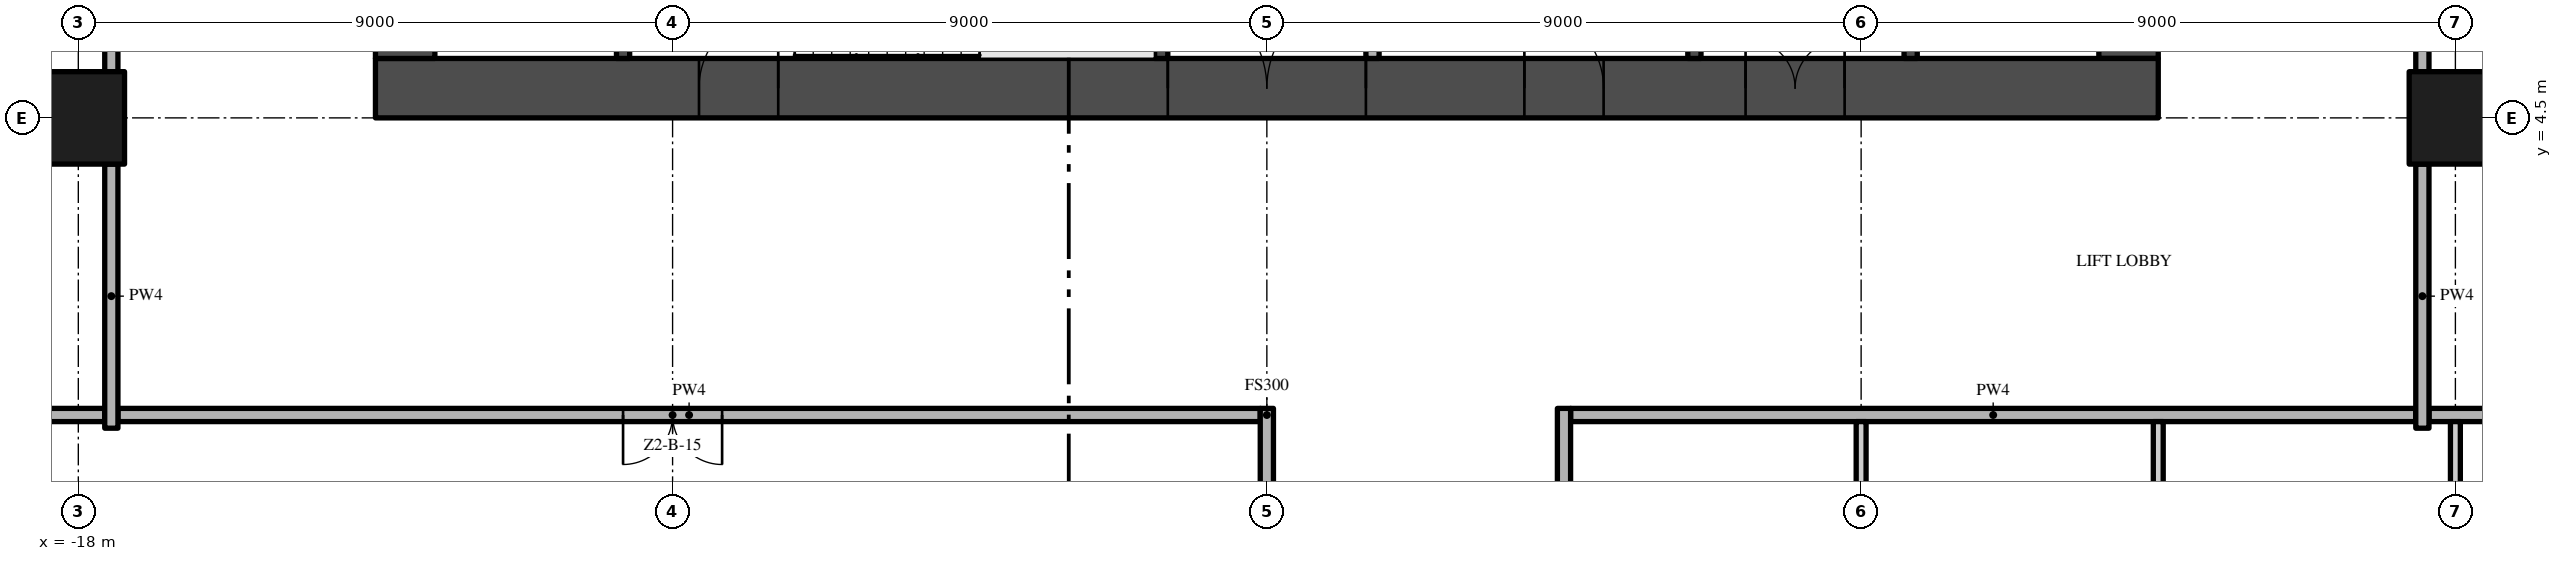
"""IFC4 building model, lengths in metres.
Left out: names, types, materials, properties, quantities, classifications, styles, units other than length and angle.
Written with IfcOpenShell. Run it as: python <this file> out.ifc"""

import sys

from ifc_helpers import new_model, si_unit, direction, frame, frame_2d, origin, origin_2d, place, context, subcontext, project, spatial, rectangle, extrude, element, fill, save


model = new_model("IFC4")
c1 = context("Model", 3, precision=1e-05, world=origin(), true_north=direction((0.0, 1.0)))
c2 = subcontext(c1, "Body", "Model", "MODEL_VIEW")
j1 = project(units=[si_unit("LENGTHUNIT", "METRE"), si_unit("PLANEANGLEUNIT", "RADIAN")], contexts=[c1])
p1 = place(None, origin())
s1 = spatial("IfcSite", under=j1, at=p1, CompositionType="ELEMENT")
p2 = place(p1, origin())
s2 = spatial("IfcBuilding", under=s1, at=p2, CompositionType="ELEMENT")
p3 = place(p2, frame((0.0, 0.0, 84.6)))
s3 = spatial("IfcBuildingStorey", under=s2, at=p3, CompositionType="ELEMENT", Elevation=84.6)
p4 = place(p3, frame((-13.5, 4.95, -0.3), z_axis=(0.0, 0.0, 1.0), x_axis=(1.0, 0.0, 0.0)))
e1 = element("IfcWall", 1, at=p4, inside=s3, PredefinedType="SHEAR", context=c2, shape_type="SweptSolid", body=[
    extrude(rectangle(XDim=27.0, YDim=0.9, at=frame_2d((13.5, 0.0))), origin(), (0.0, 0.0, 1.0), 3.8),
])
p5 = place(p4, frame((12.0, 0.0, 0.3)))
e2 = element("IfcOpeningElement", 2, at=p5, cuts=e1, PredefinedType="OPENING", context=c2, shape_type="SweptSolid", body=[
    extrude(rectangle(XDim=3.0, YDim=2.4, at=frame_2d((1.5, 1.2))), frame((0.0, 0.46, 0.0), z_axis=(0.0, -1.0, 0.0), x_axis=(1.0, 0.0, 0.0)), (0.0, 0.0, 1.0), 0.92),
])
p6 = place(p4, frame((4.9, 0.0, 0.3)))
e3 = element("IfcOpeningElement", 3, at=p6, cuts=e1, PredefinedType="OPENING", context=c2, shape_type="SweptSolid", body=[
    extrude(rectangle(XDim=1.2, YDim=2.2, at=frame_2d((0.6, 1.1))), frame((0.0, 0.46, 0.0), z_axis=(0.0, -1.0, 0.0), x_axis=(1.0, 0.0, 0.0)), (0.0, 0.0, 1.0), 0.92),
])
p7 = place(p4, frame((20.75, 0.0, 0.3)))
e4 = element("IfcOpeningElement", 4, at=p7, cuts=e1, PredefinedType="OPENING", context=c2, shape_type="SweptSolid", body=[
    extrude(rectangle(XDim=1.5, YDim=2.2, at=frame_2d((0.75, 1.1))), frame((0.0, 0.46, 0.0), z_axis=(0.0, -1.0, 0.0), x_axis=(1.0, 0.0, 0.0)), (0.0, 0.0, 1.0), 0.92),
])
p8 = place(p4, frame((17.4, 0.0, 0.3)))
e5 = element("IfcOpeningElement", 5, at=p8, cuts=e1, PredefinedType="OPENING", context=c2, shape_type="SweptSolid", body=[
    extrude(rectangle(XDim=1.2, YDim=2.2, at=frame_2d((0.6, 1.1))), frame((0.0, 0.46, 0.0), z_axis=(0.0, -1.0, 0.0), x_axis=(1.0, 0.0, 0.0)), (0.0, 0.0, 1.0), 0.92),
])
p9 = place(p3, frame((13.05, 5.4, -0.3), z_axis=(0.0, 0.0, 1.0), x_axis=(0.0, 1.0, 0.0)))
e6 = element("IfcWall", 6, at=p9, inside=s3, PredefinedType="SHEAR", context=c2, shape_type="SweptSolid", body=[
    extrude(rectangle(XDim=16.2, YDim=0.9, at=frame_2d((8.1, 0.0))), origin(), (0.0, 0.0, 1.0), 3.8),
])
p10 = place(p9, frame((6.0, 0.0, 0.3)))
e7 = element("IfcOpeningElement", 7, at=p10, cuts=e6, PredefinedType="OPENING", context=c2, shape_type="SweptSolid", body=[
    extrude(rectangle(XDim=1.2, YDim=2.2, at=frame_2d((0.6, 1.1))), frame((0.0, 0.46, 0.0), z_axis=(0.0, -1.0, 0.0), x_axis=(1.0, 0.0, 0.0)), (0.0, 0.0, 1.0), 0.92),
])
p11 = place(p3, frame((-13.05, 21.6, -0.3), z_axis=(0.0, 0.0, 1.0), x_axis=(0.0, -1.0, 0.0)))
e8 = element("IfcWall", 8, at=p11, inside=s3, PredefinedType="SHEAR", context=c2, shape_type="SweptSolid", body=[
    extrude(rectangle(XDim=16.2, YDim=0.9, at=frame_2d((8.1, 0.0))), origin(), (0.0, 0.0, 1.0), 3.8),
])
p12 = place(p11, frame((9.0, 0.0, 0.3)))
e9 = element("IfcOpeningElement", 9, at=p12, cuts=e8, PredefinedType="OPENING", context=c2, shape_type="SweptSolid", body=[
    extrude(rectangle(XDim=1.2, YDim=2.2, at=frame_2d((0.6, 1.1))), frame((0.0, 0.46, 0.0), z_axis=(0.0, -1.0, 0.0), x_axis=(1.0, 0.0, 0.0)), (0.0, 0.0, 1.0), 0.92),
])
for number, where, z_axis, x_axis in (
    (10, (-18.0, 4.5, 0.0), (0.0, 0.0, 1.0), (1.0, 0.0, 0.0)),
    (11, (18.0, 4.5, 0.0), (0.0, 0.0, 1.0), (1.0, 0.0, 0.0)),
):
    element("IfcColumn", number, at=place(p3, frame(where, z_axis=z_axis, x_axis=x_axis)), inside=s3, PredefinedType="COLUMN", context=c2, shape_type="SweptSolid", body=[
        extrude(rectangle(XDim=1.4, YDim=1.4, at=origin_2d()), origin(), (0.0, 0.0, 1.0), 3.5),
    ])
for number, where, z_axis, x_axis in (
    (12, (-9.75, 5.4, 0.0), (0.0, 0.0, 1.0), (0.0, 1.0, 0.0)),
    (13, (-1.6, 5.4, 0.0), (0.0, 0.0, 1.0), (0.0, 1.0, 0.0)),
):
    element("IfcWall", number, at=place(p3, frame(where, z_axis=z_axis, x_axis=x_axis)), inside=s3, PredefinedType="SHEAR", context=c2, shape_type="SweptSolid", body=[
        extrude(rectangle(XDim=2.55, YDim=0.2, at=frame_2d((1.275, 0.0))), origin(), (0.0, 0.0, 1.0), 3.5),
    ])
p13 = place(p3, frame((1.6, 7.5, 0.0), z_axis=(0.0, 0.0, 1.0), x_axis=(0.0, -1.0, 0.0)))
e14 = element("IfcWall", 14, at=p13, inside=s3, PredefinedType="PARTITIONING", context=c2, shape_type="SweptSolid", body=[
    extrude(rectangle(XDim=2.1, YDim=0.2, at=frame_2d((1.05, 0.0))), origin(), (0.0, 0.0, 1.0), 3.5),
])
p14 = place(p13, frame((0.25, 0.0, 0.0)))
e15 = element("IfcOpeningElement", 15, at=p14, cuts=e14, PredefinedType="OPENING", context=c2, shape_type="SweptSolid", body=[
    extrude(rectangle(XDim=0.9, YDim=2.1, at=frame_2d((0.45, 1.05))), frame((0.0, 0.11, 0.0), z_axis=(0.0, -1.0, 0.0), x_axis=(1.0, 0.0, 0.0)), (0.0, 0.0, 1.0), 0.22),
])
p15 = place(p3, frame((6.475, 5.4, 0.0), z_axis=(0.0, 0.0, 1.0), x_axis=(0.0, 1.0, 0.0)))
e16 = element("IfcWall", 16, at=p15, inside=s3, PredefinedType="SHEAR", context=c2, shape_type="SweptSolid", body=[
    extrude(rectangle(XDim=2.1, YDim=0.2, at=frame_2d((1.05, 0.0))), origin(), (0.0, 0.0, 1.0), 3.5),
])
p16 = place(p3, frame((9.75, 5.4, 0.0), z_axis=(0.0, 0.0, 1.0), x_axis=(0.0, 1.0, 0.0)))
e17 = element("IfcWall", 17, at=p16, inside=s3, PredefinedType="SHEAR", context=c2, shape_type="SweptSolid", body=[
    extrude(rectangle(XDim=2.2, YDim=0.2, at=frame_2d((1.1, 0.0))), origin(), (0.0, 0.0, 1.0), 3.5),
])
p17 = place(p16, frame((0.55, 0.0, 0.0)))
e18 = element("IfcOpeningElement", 18, at=p17, cuts=e17, PredefinedType="OPENING", context=c2, shape_type="SweptSolid", body=[
    extrude(rectangle(XDim=1.1, YDim=2.1, at=frame_2d((0.55, 1.05))), frame((0.0, 0.11, 0.0), z_axis=(0.0, -1.0, 0.0), x_axis=(1.0, 0.0, 0.0)), (0.0, 0.0, 1.0), 0.22),
])
p18 = place(p3, frame((-0.1, 0.0, 0.0), z_axis=(0.0, 0.0, 1.0), x_axis=(-1.0, 0.0, 0.0)))
e19 = element("IfcWall", 19, at=p18, inside=s3, PredefinedType="PARTITIONING", context=c2, shape_type="SweptSolid", body=[
    extrude(rectangle(XDim=17.3, YDim=0.2, at=frame_2d((8.65, 0.0))), origin(), (0.0, 0.0, 1.0), 3.5),
])
p19 = place(p18, frame((8.15, 0.0, 0.0)))
e20 = element("IfcOpeningElement", 20, at=p19, cuts=e19, PredefinedType="OPENING", context=c2, shape_type="SweptSolid", body=[
    extrude(rectangle(XDim=1.5, YDim=2.4, at=frame_2d((0.75, 1.2))), frame((0.0, 0.11, 0.0), z_axis=(0.0, -1.0, 0.0), x_axis=(1.0, 0.0, 0.0)), (0.0, 0.0, 1.0), 0.22),
])
p20 = place(p3, frame((4.6, 0.0, 0.0), z_axis=(0.0, 0.0, 1.0), x_axis=(1.0, 0.0, 0.0)))
e21 = element("IfcWall", 21, at=p20, inside=s3, PredefinedType="PARTITIONING", context=c2, shape_type="SweptSolid", body=[
    extrude(rectangle(XDim=12.8, YDim=0.2, at=frame_2d((6.4, 0.0))), origin(), (0.0, 0.0, 1.0), 3.5),
])
for number, where, z_axis, x_axis in (
    (22, (-26.7, 0.0, 0.0), (0.0, 0.0, 1.0), (1.0, 0.0, 0.0)),
    (23, (17.6, 0.0, 0.0), (0.0, 0.0, 1.0), (1.0, 0.0, 0.0)),
):
    element("IfcWall", number, at=place(p3, frame(where, z_axis=z_axis, x_axis=x_axis)), inside=s3, PredefinedType="PARTITIONING", context=c2, shape_type="SweptSolid", body=[
        extrude(rectangle(XDim=9.1, YDim=0.2, at=frame_2d((4.55, 0.0))), origin(), (0.0, 0.0, 1.0), 3.5),
    ])
p21 = place(p3, frame((-17.5, -0.2, 0.0), z_axis=(0.0, 0.0, 1.0), x_axis=(0.0, 1.0, 0.0)))
e24 = element("IfcWall", 24, at=p21, inside=s3, PredefinedType="PARTITIONING", context=c2, shape_type="SweptSolid", body=[
    extrude(rectangle(XDim=4.0, YDim=0.2, at=frame_2d((2.0, 0.0))), origin(), (0.0, 0.0, 1.0), 3.5),
])
p22 = place(p3, frame((-17.5, 5.2, 0.0), z_axis=(0.0, 0.0, 1.0), x_axis=(0.0, 1.0, 0.0)))
e25 = element("IfcWall", 25, at=p22, inside=s3, PredefinedType="PARTITIONING", context=c2, shape_type="SweptSolid", body=[
    extrude(rectangle(XDim=7.6, YDim=0.2, at=frame_2d((3.8, 0.0))), origin(), (0.0, 0.0, 1.0), 3.5),
])
p23 = place(p3, frame((0.0, -3.8, 0.0), z_axis=(0.0, 0.0, 1.0), x_axis=(0.0, 1.0, 0.0)))
e26 = element("IfcWall", 26, at=p23, inside=s3, PredefinedType="PARTITIONING", context=c2, shape_type="SweptSolid", body=[
    extrude(rectangle(XDim=3.9, YDim=0.2, at=frame_2d((1.95, 0.0))), origin(), (0.0, 0.0, 1.0), 3.5),
])
p24 = place(p3, frame((4.5, 0.1, 0.0), z_axis=(0.0, 0.0, 1.0), x_axis=(0.0, -1.0, 0.0)))
e27 = element("IfcWall", 27, at=p24, inside=s3, PredefinedType="PARTITIONING", context=c2, shape_type="SweptSolid", body=[
    extrude(rectangle(XDim=22.3, YDim=0.2, at=frame_2d((11.15, 0.0))), origin(), (0.0, 0.0, 1.0), 3.5),
])
p25 = place(p24, frame((10.6, 0.0, 0.0)))
e28 = element("IfcOpeningElement", 28, at=p25, cuts=e27, PredefinedType="OPENING", context=c2, shape_type="SweptSolid", body=[
    extrude(rectangle(XDim=1.5, YDim=2.4, at=frame_2d((0.75, 1.2))), frame((0.0, 0.11, 0.0), z_axis=(0.0, -1.0, 0.0), x_axis=(1.0, 0.0, 0.0)), (0.0, 0.0, 1.0), 0.22),
])
p26 = place(p3, frame((9.0, -3.8, 0.0), z_axis=(0.0, 0.0, 1.0), x_axis=(0.0, 1.0, 0.0)))
e29 = element("IfcWall", 29, at=p26, inside=s3, PredefinedType="PARTITIONING", context=c2, shape_type="SweptSolid", body=[
    extrude(rectangle(XDim=3.7, YDim=0.15, at=frame_2d((1.85, 0.0))), origin(), (0.0, 0.0, 1.0), 3.5),
])
p27 = place(p3, frame((13.5, -9.075, 0.0), z_axis=(0.0, 0.0, 1.0), x_axis=(0.0, 1.0, 0.0)))
e30 = element("IfcWall", 30, at=p27, inside=s3, PredefinedType="PARTITIONING", context=c2, shape_type="SweptSolid", body=[
    extrude(rectangle(XDim=8.975, YDim=0.15, at=frame_2d((4.487, 0.0))), origin(), (0.0, 0.0, 1.0), 3.5),
])
p28 = place(p3, frame((17.5, -0.2, 0.0), z_axis=(0.0, 0.0, 1.0), x_axis=(0.0, 1.0, 0.0)))
e31 = element("IfcWall", 31, at=p28, inside=s3, PredefinedType="PARTITIONING", context=c2, shape_type="SweptSolid", body=[
    extrude(rectangle(XDim=4.0, YDim=0.2, at=frame_2d((2.0, 0.0))), origin(), (0.0, 0.0, 1.0), 3.5),
])
p29 = place(p3, frame((17.5, 12.8, 0.0), z_axis=(0.0, 0.0, 1.0), x_axis=(0.0, -1.0, 0.0)))
e32 = element("IfcWall", 32, at=p29, inside=s3, PredefinedType="PARTITIONING", context=c2, shape_type="SweptSolid", body=[
    extrude(rectangle(XDim=7.6, YDim=0.2, at=frame_2d((3.8, 0.0))), origin(), (0.0, 0.0, 1.0), 3.5),
])
p30 = place(p29, frame((5.45, 0.0, 0.0)))
e33 = element("IfcOpeningElement", 33, at=p30, cuts=e32, PredefinedType="OPENING", context=c2, shape_type="SweptSolid", body=[
    extrude(rectangle(XDim=1.2, YDim=2.4, at=frame_2d((0.6, 1.2))), frame((0.0, 0.11, 0.0), z_axis=(0.0, -1.0, 0.0), x_axis=(1.0, 0.0, 0.0)), (0.0, 0.0, 1.0), 0.22),
])
p31 = place(p3, frame((18.0, -0.1, 0.0), z_axis=(0.0, 0.0, 1.0), x_axis=(0.0, -1.0, 0.0)))
e34 = element("IfcWall", 34, at=p31, inside=s3, PredefinedType="PARTITIONING", context=c2, shape_type="SweptSolid", body=[
    extrude(rectangle(XDim=3.7, YDim=0.15, at=frame_2d((1.85, 0.0))), origin(), (0.0, 0.0, 1.0), 3.5),
])
p32 = place(p31, frame((2.55, 0.0, 0.0)))
e35 = element("IfcOpeningElement", 35, at=p32, cuts=e34, PredefinedType="OPENING", context=c2, shape_type="SweptSolid", body=[
    extrude(rectangle(XDim=1.0, YDim=2.4, at=frame_2d((0.5, 1.2))), frame((0.0, 0.085, 0.0), z_axis=(0.0, -1.0, 0.0), x_axis=(1.0, 0.0, 0.0)), (0.0, 0.0, 1.0), 0.17),
])
p33 = place(p5, frame((3.0, 0.0, 0.0), z_axis=(0.0, 0.0, 1.0), x_axis=(-1.0, 0.0, 0.0)))
e36 = element("IfcDoor", 36, at=p33, inside=s3, OperationType="DOUBLE_DOOR_SINGLE_SWING", PredefinedType="DOOR", context=c2, shape_type="SweptSolid", body=[
    extrude(rectangle(XDim=3.0, YDim=2.4, at=frame_2d((1.5, 1.2))), frame((0.0, 0.025, 0.0), z_axis=(0.0, -1.0, 0.0), x_axis=(1.0, 0.0, 0.0)), (0.0, 0.0, 1.0), 0.05),
])
fill(e2, e36)
p34 = place(p6, frame((1.2, 0.0, 0.0), z_axis=(0.0, 0.0, 1.0), x_axis=(-1.0, 0.0, 0.0)))
e37 = element("IfcDoor", 37, at=p34, inside=s3, OperationType="SINGLE_SWING_LEFT", PredefinedType="DOOR", context=c2, shape_type="SweptSolid", body=[
    extrude(rectangle(XDim=1.2, YDim=2.2, at=frame_2d((0.6, 1.1))), frame((0.0, 0.025, 0.0), z_axis=(0.0, -1.0, 0.0), x_axis=(1.0, 0.0, 0.0)), (0.0, 0.0, 1.0), 0.05),
])
fill(e3, e37)
p35 = place(p7, frame((1.5, 0.0, 0.0), z_axis=(0.0, 0.0, 1.0), x_axis=(-1.0, 0.0, 0.0)))
e38 = element("IfcDoor", 38, at=p35, inside=s3, OperationType="DOUBLE_DOOR_SINGLE_SWING", PredefinedType="DOOR", context=c2, shape_type="SweptSolid", body=[
    extrude(rectangle(XDim=1.5, YDim=2.2, at=frame_2d((0.75, 1.1))), frame((0.0, 0.025, 0.0), z_axis=(0.0, -1.0, 0.0), x_axis=(1.0, 0.0, 0.0)), (0.0, 0.0, 1.0), 0.05),
])
fill(e4, e38)
p36 = place(p8, frame((1.2, 0.0, 0.0), z_axis=(0.0, 0.0, 1.0), x_axis=(-1.0, 0.0, 0.0)))
e39 = element("IfcDoor", 39, at=p36, inside=s3, OperationType="SINGLE_SWING_RIGHT", PredefinedType="DOOR", context=c2, shape_type="SweptSolid", body=[
    extrude(rectangle(XDim=1.2, YDim=2.2, at=frame_2d((0.6, 1.1))), frame((0.0, 0.025, 0.0), z_axis=(0.0, -1.0, 0.0), x_axis=(1.0, 0.0, 0.0)), (0.0, 0.0, 1.0), 0.05),
])
fill(e5, e39)
p37 = place(p19, origin())
e40 = element("IfcDoor", 40, at=p37, inside=s3, OperationType="DOUBLE_DOOR_SINGLE_SWING", PredefinedType="DOOR", context=c2, shape_type="SweptSolid", body=[
    extrude(rectangle(XDim=1.5, YDim=2.4, at=frame_2d((0.75, 1.2))), frame((0.0, 0.025, 0.0), z_axis=(0.0, -1.0, 0.0), x_axis=(1.0, 0.0, 0.0)), (0.0, 0.0, 1.0), 0.05),
])
fill(e20, e40)
save(model, sys.argv[1])
